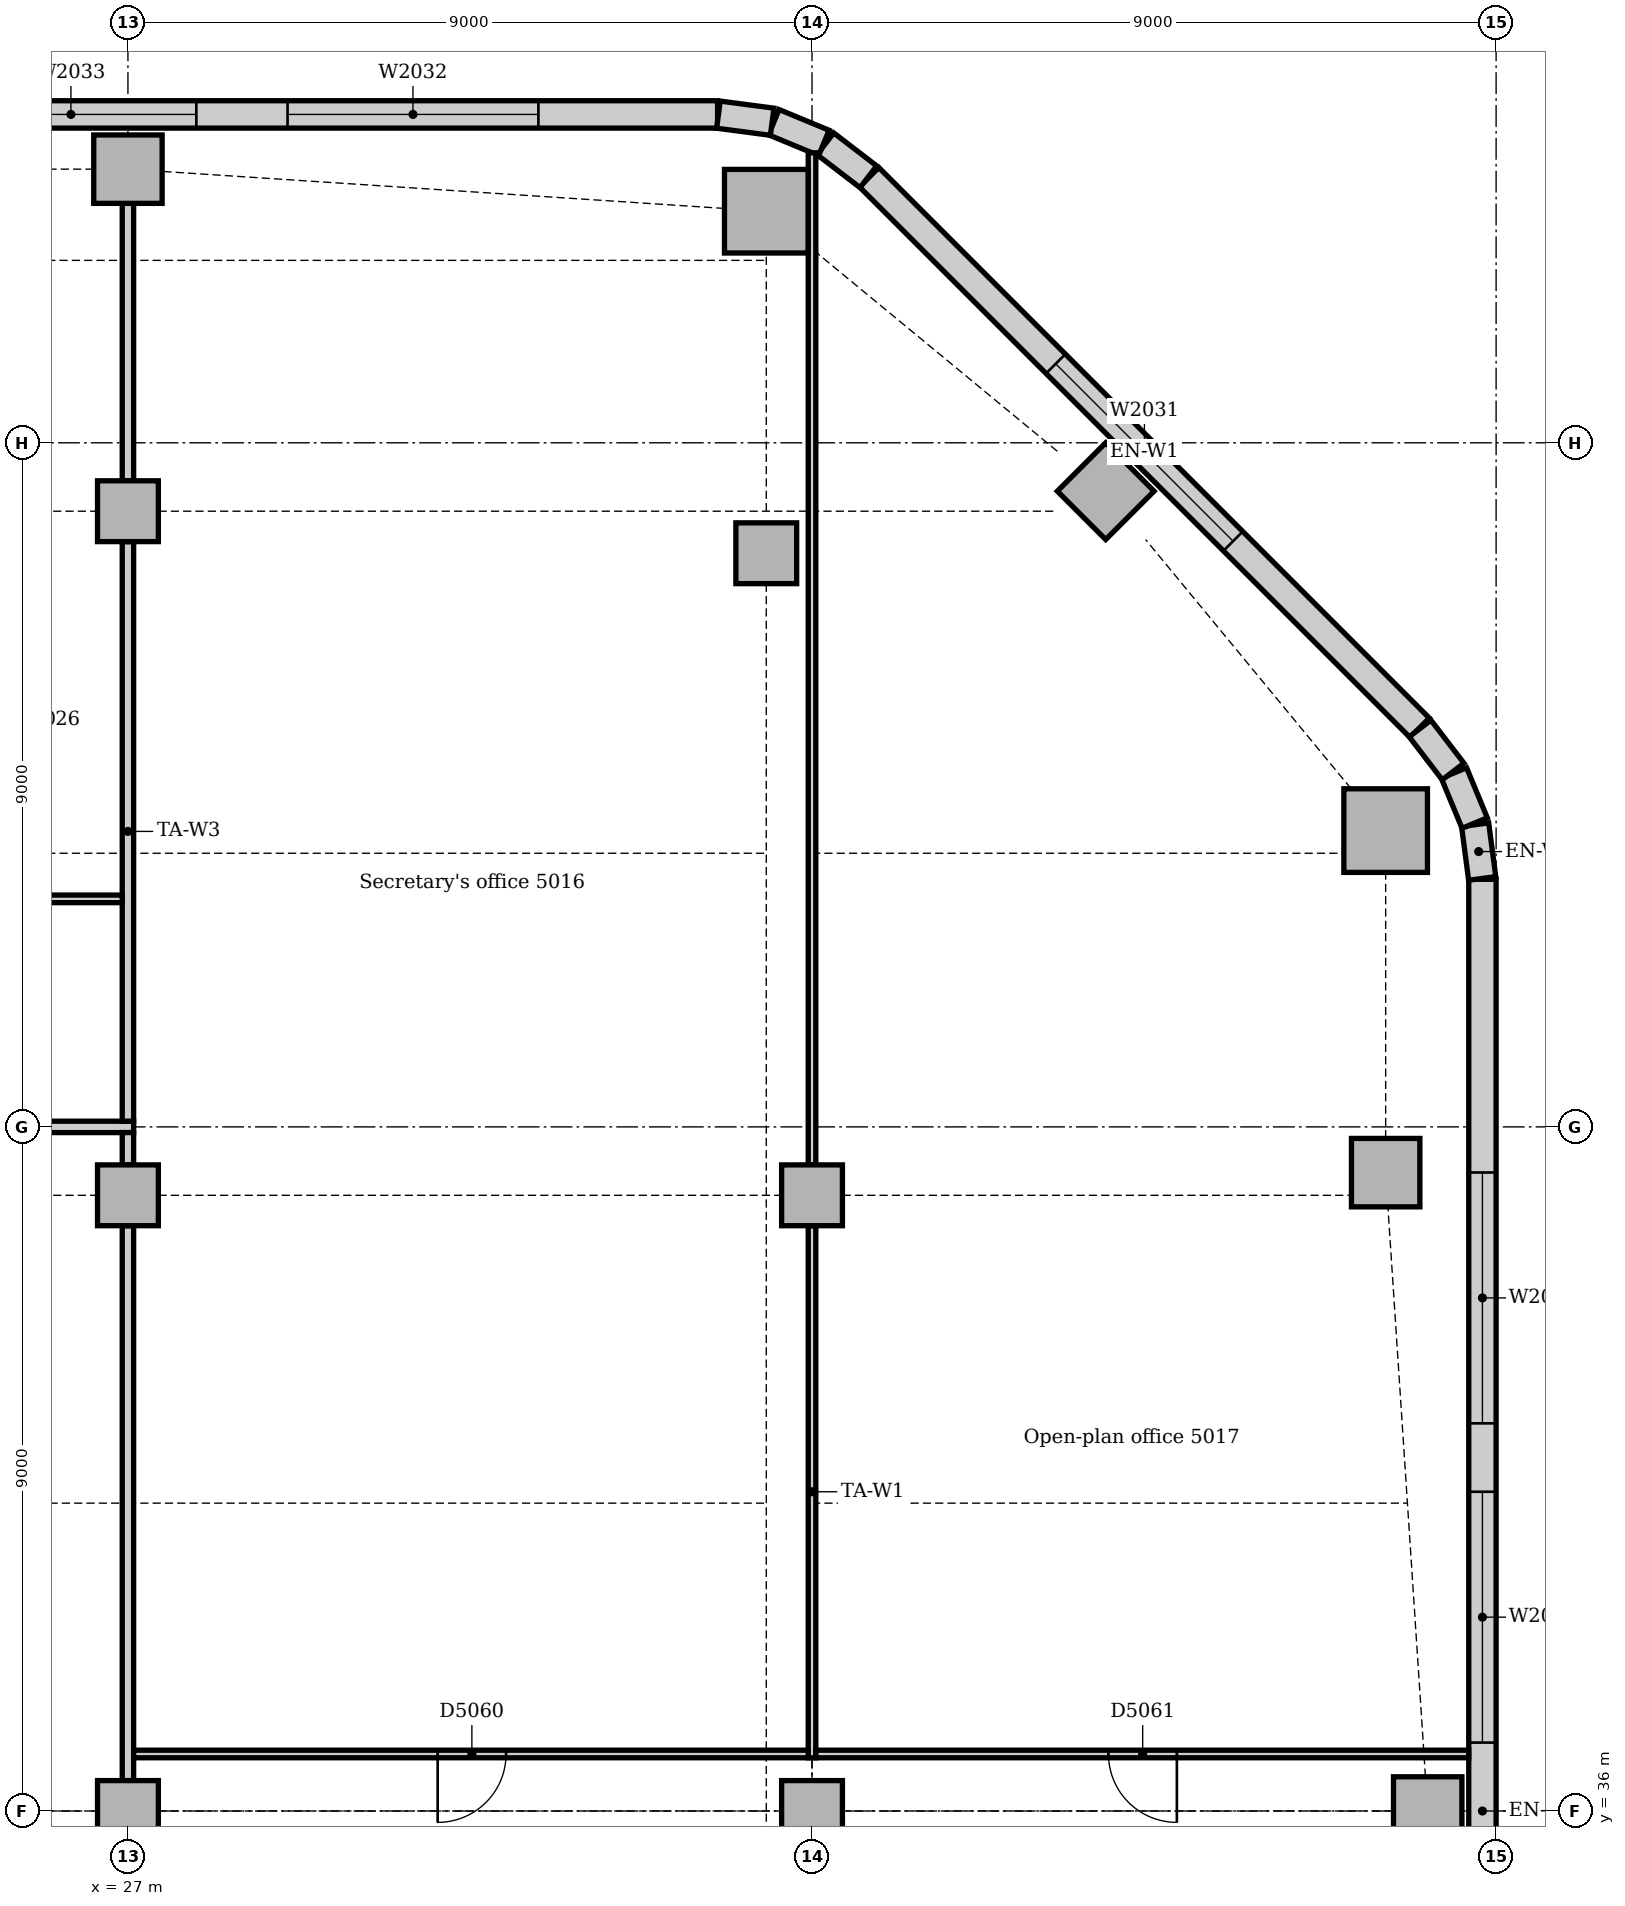
"""IFC4 building model, lengths in metres.
Left out: names, types, materials, properties, quantities, classifications, styles, units other than length and angle.
Written with IfcOpenShell. Run it as: python <this file> out.ifc"""

import sys

from ifc_helpers import new_model, si_unit, direction, frame, frame_2d, origin, origin_2d, place, context, subcontext, project, spatial, rectangle, extrude, element, fill, save


model = new_model("IFC4")
c1 = context("Model", 3, precision=1e-05, world=origin(), true_north=direction((0.0, 1.0)))
c2 = subcontext(c1, "Body", "Model", "MODEL_VIEW")
j1 = project(units=[si_unit("LENGTHUNIT", "METRE"), si_unit("PLANEANGLEUNIT", "RADIAN")], contexts=[c1])
p1 = place(None, origin())
s1 = spatial("IfcSite", under=j1, at=p1, CompositionType="ELEMENT")
p2 = place(p1, origin())
s2 = spatial("IfcBuilding", under=s1, at=p2, CompositionType="ELEMENT")
p3 = place(p2, frame((0.0, 0.0, 210.0)))
s3 = spatial("IfcBuildingStorey", under=s2, at=p3, CompositionType="ELEMENT", Elevation=210.0)
for number, where, z_axis, x_axis in (
    (1, (43.547, 48.898, 0.0), (0.0, 0.0, 1.0), (1.0, 0.0, 0.0)),
    (2, (35.398, 57.047, 0.0), (0.0, 0.0, 1.0), (1.0, 0.0, 0.0)),
):
    element("IfcColumn", number, at=place(p3, frame(where, z_axis=z_axis, x_axis=x_axis)), inside=s3, PredefinedType="COLUMN", context=c2, shape_type="SweptSolid", body=[
        extrude(rectangle(XDim=1.1, YDim=1.1, at=origin_2d()), origin(), (0.0, 0.0, 1.0), 3.85),
    ])
for number, where, z_axis, x_axis in (
    (3, (44.1, 36.0, 0.0), (0.0, 0.0, 1.0), (1.0, 0.0, 0.0)),
    (4, (43.547, 44.398, 0.0), (0.0, 0.0, 1.0), (1.0, 0.0, 0.0)),
    (5, (39.864, 53.364, 0.0), (0.0, 0.0, 1.0), (0.707, 0.707, 0.0)),
    (6, (27.0, 57.6, 0.0), (0.0, 0.0, 1.0), (1.0, 0.0, 0.0)),
):
    element("IfcColumn", number, at=place(p3, frame(where, z_axis=z_axis, x_axis=x_axis)), inside=s3, PredefinedType="COLUMN", context=c2, shape_type="SweptSolid", body=[
        extrude(rectangle(XDim=0.9, YDim=0.9, at=origin_2d()), origin(), (0.0, 0.0, 1.0), 3.85),
    ])
for number, where, z_axis, x_axis in (
    (7, (27.0, 36.0, 0.0), (0.0, 0.0, 1.0), (1.0, 0.0, 0.0)),
    (8, (27.0, 44.1, 0.0), (0.0, 0.0, 1.0), (1.0, 0.0, 0.0)),
    (9, (27.0, 53.1, 0.0), (0.0, 0.0, 1.0), (1.0, 0.0, 0.0)),
    (10, (36.0, 36.0, 0.0), (0.0, 0.0, 1.0), (1.0, 0.0, 0.0)),
    (11, (36.0, 44.1, 0.0), (0.0, 0.0, 1.0), (1.0, 0.0, 0.0)),
    (12, (35.398, 52.547, 0.0), (0.0, 0.0, 1.0), (1.0, 0.0, 0.0)),
):
    element("IfcColumn", number, at=place(p3, frame(where, z_axis=z_axis, x_axis=x_axis)), inside=s3, PredefinedType="COLUMN", context=c2, shape_type="SweptSolid", body=[
        extrude(rectangle(XDim=0.8, YDim=0.8, at=origin_2d()), origin(), (0.0, 0.0, 1.0), 3.85),
    ])
p4 = place(p3, frame((44.82, 23.743, 0.0), z_axis=(0.0, 0.0, 1.0), x_axis=(0.0, 1.0, 0.0)))
e13 = element("IfcWall", 13, at=p4, inside=s3, PredefinedType="STANDARD", context=c2, shape_type="SweptSolid", body=[
    extrude(rectangle(XDim=24.515, YDim=0.36, at=frame_2d((12.257, 0.0))), origin(), (0.0, 0.0, 1.0), 3.85),
])
p5 = place(p4, frame((3.857, 0.0, 0.9)))
e14 = element("IfcOpeningElement", 14, at=p5, cuts=e13, PredefinedType="OPENING", context=c2, shape_type="SweptSolid", body=[
    extrude(rectangle(XDim=3.3, YDim=1.6, at=frame_2d((1.65, 0.8))), frame((0.0, 0.19, 0.0), z_axis=(0.0, -1.0, 0.0), x_axis=(1.0, 0.0, 0.0)), (0.0, 0.0, 1.0), 0.38),
])
p6 = place(p4, frame((8.357, 0.0, 0.9)))
e15 = element("IfcOpeningElement", 15, at=p6, cuts=e13, PredefinedType="OPENING", context=c2, shape_type="SweptSolid", body=[
    extrude(rectangle(XDim=3.3, YDim=1.6, at=frame_2d((1.65, 0.8))), frame((0.0, 0.19, 0.0), z_axis=(0.0, -1.0, 0.0), x_axis=(1.0, 0.0, 0.0)), (0.0, 0.0, 1.0), 0.38),
])
p7 = place(p4, frame((13.157, 0.0, 0.9)))
e16 = element("IfcOpeningElement", 16, at=p7, cuts=e13, PredefinedType="OPENING", context=c2, shape_type="SweptSolid", body=[
    extrude(rectangle(XDim=3.3, YDim=1.6, at=frame_2d((1.65, 0.8))), frame((0.0, 0.19, 0.0), z_axis=(0.0, -1.0, 0.0), x_axis=(1.0, 0.0, 0.0)), (0.0, 0.0, 1.0), 0.38),
])
p8 = place(p4, frame((17.357, 0.0, 0.9)))
e17 = element("IfcOpeningElement", 17, at=p8, cuts=e13, PredefinedType="OPENING", context=c2, shape_type="SweptSolid", body=[
    extrude(rectangle(XDim=3.3, YDim=1.6, at=frame_2d((1.65, 0.8))), frame((0.0, 0.19, 0.0), z_axis=(0.0, -1.0, 0.0), x_axis=(1.0, 0.0, 0.0)), (0.0, 0.0, 1.0), 0.38),
])
p9 = place(p3, frame((43.994, 50.251, 0.0), z_axis=(0.0, 0.0, 1.0), x_axis=(-0.707106781187, 0.707106781187, 0.0)))
e18 = element("IfcWall", 18, at=p9, inside=s3, PredefinedType="STANDARD", context=c2, shape_type="SweptSolid", body=[
    extrude(rectangle(XDim=10.243, YDim=0.36, at=frame_2d((5.121, 0.0))), origin(), (0.0, 0.0, 1.0), 3.85),
])
p10 = place(p9, frame((3.471, 0.0, 0.9)))
e19 = element("IfcOpeningElement", 19, at=p10, cuts=e18, PredefinedType="OPENING", context=c2, shape_type="SweptSolid", body=[
    extrude(rectangle(XDim=3.3, YDim=1.6, at=frame_2d((1.65, 0.8))), frame((0.0, 0.19, 0.0), z_axis=(0.0, -1.0, 0.0), x_axis=(1.0, 0.0, 0.0)), (0.0, 0.0, 1.0), 0.38),
])
p11 = place(p3, frame((34.757, 58.32, 0.0), z_axis=(0.0, 0.0, 1.0), x_axis=(-1.0, 0.0, 0.0)))
e20 = element("IfcWall", 20, at=p11, inside=s3, PredefinedType="STANDARD", context=c2, shape_type="SweptSolid", body=[
    extrude(rectangle(XDim=30.515, YDim=0.36, at=frame_2d((15.257, 0.0))), origin(), (0.0, 0.0, 1.0), 3.85),
])
p12 = place(p11, frame((2.357, 0.0, 0.9)))
e21 = element("IfcOpeningElement", 21, at=p12, cuts=e20, PredefinedType="OPENING", context=c2, shape_type="SweptSolid", body=[
    extrude(rectangle(XDim=3.3, YDim=1.6, at=frame_2d((1.65, 0.8))), frame((0.0, 0.19, 0.0), z_axis=(0.0, -1.0, 0.0), x_axis=(1.0, 0.0, 0.0)), (0.0, 0.0, 1.0), 0.38),
])
p13 = place(p11, frame((6.857, 0.0, 0.9)))
e22 = element("IfcOpeningElement", 22, at=p13, cuts=e20, PredefinedType="OPENING", context=c2, shape_type="SweptSolid", body=[
    extrude(rectangle(XDim=3.3, YDim=1.6, at=frame_2d((1.65, 0.8))), frame((0.0, 0.19, 0.0), z_axis=(0.0, -1.0, 0.0), x_axis=(1.0, 0.0, 0.0)), (0.0, 0.0, 1.0), 0.38),
])
p14 = place(p11, frame((12.457, 0.0, 0.9)))
e23 = element("IfcOpeningElement", 23, at=p14, cuts=e20, PredefinedType="OPENING", context=c2, shape_type="SweptSolid", body=[
    extrude(rectangle(XDim=1.8, YDim=1.6, at=frame_2d((0.9, 0.8))), frame((0.0, 0.19, 0.0), z_axis=(0.0, -1.0, 0.0), x_axis=(1.0, 0.0, 0.0)), (0.0, 0.0, 1.0), 0.38),
])
p15 = place(p11, frame((15.857, 0.0, 0.9)))
e24 = element("IfcOpeningElement", 24, at=p15, cuts=e20, PredefinedType="OPENING", context=c2, shape_type="SweptSolid", body=[
    extrude(rectangle(XDim=3.3, YDim=1.6, at=frame_2d((1.65, 0.8))), frame((0.0, 0.19, 0.0), z_axis=(0.0, -1.0, 0.0), x_axis=(1.0, 0.0, 0.0)), (0.0, 0.0, 1.0), 0.38),
])
p16 = place(p11, frame((20.357, 0.0, 0.9)))
e25 = element("IfcOpeningElement", 25, at=p16, cuts=e20, PredefinedType="OPENING", context=c2, shape_type="SweptSolid", body=[
    extrude(rectangle(XDim=3.3, YDim=1.6, at=frame_2d((1.65, 0.8))), frame((0.0, 0.19, 0.0), z_axis=(0.0, -1.0, 0.0), x_axis=(1.0, 0.0, 0.0)), (0.0, 0.0, 1.0), 0.38),
])
p17 = place(p11, frame((24.857, 0.0, 0.9)))
e26 = element("IfcOpeningElement", 26, at=p17, cuts=e20, PredefinedType="OPENING", context=c2, shape_type="SweptSolid", body=[
    extrude(rectangle(XDim=3.3, YDim=1.6, at=frame_2d((1.65, 0.8))), frame((0.0, 0.19, 0.0), z_axis=(0.0, -1.0, 0.0), x_axis=(1.0, 0.0, 0.0)), (0.0, 0.0, 1.0), 0.38),
])
for number, where, z_axis, x_axis in (
    (27, (44.817, 48.269, 0.0), (0.0, 0.0, 1.0), (-0.131, 0.991, 0.0)),
    (28, (44.718, 48.997, 0.0), (0.0, 0.0, 1.0), (-0.383, 0.924, 0.0)),
):
    element("IfcWall", number, at=place(p3, frame(where, z_axis=z_axis, x_axis=x_axis)), inside=s3, PredefinedType="STANDARD", context=c2, shape_type="SweptSolid", body=[
        extrude(rectangle(XDim=0.713, YDim=0.36, at=frame_2d((0.356, 0.0))), origin(), (0.0, 0.0, 1.0), 3.85),
    ])
for number, where, z_axis, x_axis in (
    (29, (44.434, 49.675, 0.0), (0.0, 0.0, 1.0), (-0.609, 0.793, 0.0)),
    (30, (36.741, 57.5, 0.0), (0.0, 0.0, 1.0), (-0.793, 0.609, 0.0)),
):
    element("IfcWall", number, at=place(p3, frame(where, z_axis=z_axis, x_axis=x_axis)), inside=s3, PredefinedType="STANDARD", context=c2, shape_type="SweptSolid", body=[
        extrude(rectangle(XDim=0.713, YDim=0.36, at=frame_2d((0.357, 0.0))), origin(), (0.0, 0.0, 1.0), 3.85),
    ])
for number, where, z_axis, x_axis in (
    (31, (36.156, 57.945, 0.0), (0.0, 0.0, 1.0), (-0.924, 0.383, 0.0)),
    (32, (35.476, 58.224, 0.0), (0.0, 0.0, 1.0), (-0.991, 0.131, 0.0)),
):
    element("IfcWall", number, at=place(p3, frame(where, z_axis=z_axis, x_axis=x_axis)), inside=s3, PredefinedType="STANDARD", context=c2, shape_type="SweptSolid", body=[
        extrude(rectangle(XDim=0.713, YDim=0.36, at=frame_2d((0.356, 0.0))), origin(), (0.0, 0.0, 1.0), 3.85),
    ])
p18 = place(p3, frame((0.36, 45.0, 0.0), z_axis=(0.0, 0.0, 1.0), x_axis=(1.0, 0.0, 0.0)))
e33 = element("IfcWall", 33, at=p18, inside=s3, PredefinedType="PARTITIONING", context=c2, shape_type="SweptSolid", body=[
    extrude(rectangle(XDim=26.715, YDim=0.15, at=frame_2d((13.357, 0.0))), origin(), (0.0, 0.0, 1.0), 3.85),
])
p19 = place(p18, frame((9.05, 0.0, 0.0)))
e34 = element("IfcOpeningElement", 34, at=p19, cuts=e33, PredefinedType="OPENING", context=c2, shape_type="SweptSolid", body=[
    extrude(rectangle(XDim=0.9, YDim=2.1, at=frame_2d((0.45, 1.05))), frame((0.0, 0.085, 0.0), z_axis=(0.0, -1.0, 0.0), x_axis=(1.0, 0.0, 0.0)), (0.0, 0.0, 1.0), 0.17),
])
p20 = place(p18, frame((21.59, 0.0, 0.0)))
e35 = element("IfcOpeningElement", 35, at=p20, cuts=e33, PredefinedType="OPENING", context=c2, shape_type="SweptSolid", body=[
    extrude(rectangle(XDim=1.0, YDim=2.1, at=frame_2d((0.5, 1.05))), frame((0.0, 0.085, 0.0), z_axis=(0.0, -1.0, 0.0), x_axis=(1.0, 0.0, 0.0)), (0.0, 0.0, 1.0), 0.17),
])
p21 = place(p3, frame((27.0, 36.4, 0.0), z_axis=(0.0, 0.0, 1.0), x_axis=(0.0, 1.0, 0.0)))
e36 = element("IfcWall", 36, at=p21, inside=s3, PredefinedType="PARTITIONING", context=c2, shape_type="SweptSolid", body=[
    extrude(rectangle(XDim=7.3, YDim=0.15, at=frame_2d((3.65, 0.0))), origin(), (0.0, 0.0, 1.0), 3.35),
])
p22 = place(p3, frame((27.0, 44.5, 0.0), z_axis=(0.0, 0.0, 1.0), x_axis=(0.0, 1.0, 0.0)))
e37 = element("IfcWall", 37, at=p22, inside=s3, PredefinedType="PARTITIONING", context=c2, shape_type="SweptSolid", body=[
    extrude(rectangle(XDim=0.425, YDim=0.15, at=frame_2d((0.212, 0.0))), origin(), (0.0, 0.0, 1.0), 3.85),
])
p23 = place(p3, frame((27.0, 45.075, 0.0), z_axis=(0.0, 0.0, 1.0), x_axis=(0.0, 1.0, 0.0)))
e38 = element("IfcWall", 38, at=p23, inside=s3, PredefinedType="PARTITIONING", context=c2, shape_type="SweptSolid", body=[
    extrude(rectangle(XDim=7.625, YDim=0.15, at=frame_2d((3.812, 0.0))), origin(), (0.0, 0.0, 1.0), 3.35),
])
p24 = place(p3, frame((27.0, 53.5, 0.0), z_axis=(0.0, 0.0, 1.0), x_axis=(0.0, 1.0, 0.0)))
e39 = element("IfcWall", 39, at=p24, inside=s3, PredefinedType="PARTITIONING", context=c2, shape_type="SweptSolid", body=[
    extrude(rectangle(XDim=3.65, YDim=0.15, at=frame_2d((1.825, 0.0))), origin(), (0.0, 0.0, 1.0), 3.41),
])
p25 = place(p3, frame((36.0, 36.7, 0.0), z_axis=(0.0, 0.0, 1.0), x_axis=(0.0, 1.0, 0.0)))
e40 = element("IfcWall", 40, at=p25, inside=s3, PredefinedType="PARTITIONING", context=c2, shape_type="SweptSolid", body=[
    extrude(rectangle(XDim=7.0, YDim=0.1, at=frame_2d((3.5, 0.0))), origin(), (0.0, 0.0, 1.0), 3.35),
])
p26 = place(p3, frame((36.0, 44.5, 0.0), z_axis=(0.0, 0.0, 1.0), x_axis=(0.0, 1.0, 0.0)))
e41 = element("IfcWall", 41, at=p26, inside=s3, PredefinedType="PARTITIONING", context=c2, shape_type="SweptSolid", body=[
    extrude(rectangle(XDim=13.315, YDim=0.1, at=frame_2d((6.657, 0.0))), origin(), (0.0, 0.0, 1.0), 3.35),
])
p27 = place(p3, frame((27.075, 36.75, 0.0), z_axis=(0.0, 0.0, 1.0), x_axis=(1.0, 0.0, 0.0)))
e42 = element("IfcWall", 42, at=p27, inside=s3, PredefinedType="PARTITIONING", context=c2, shape_type="SweptSolid", body=[
    extrude(rectangle(XDim=8.875, YDim=0.1, at=frame_2d((4.438, 0.0))), origin(), (0.0, 0.0, 1.0), 3.85),
])
p28 = place(p27, frame((4.0, 0.0, 0.0)))
e43 = element("IfcOpeningElement", 43, at=p28, cuts=e42, PredefinedType="OPENING", context=c2, shape_type="SweptSolid", body=[
    extrude(rectangle(XDim=0.9, YDim=2.1, at=frame_2d((0.45, 1.05))), frame((0.0, 0.06, 0.0), z_axis=(0.0, -1.0, 0.0), x_axis=(1.0, 0.0, 0.0)), (0.0, 0.0, 1.0), 0.12),
])
p29 = place(p3, frame((36.05, 36.75, 0.0), z_axis=(0.0, 0.0, 1.0), x_axis=(1.0, 0.0, 0.0)))
e44 = element("IfcWall", 44, at=p29, inside=s3, PredefinedType="PARTITIONING", context=c2, shape_type="SweptSolid", body=[
    extrude(rectangle(XDim=8.59, YDim=0.1, at=frame_2d((4.295, 0.0))), origin(), (0.0, 0.0, 1.0), 3.85),
])
p30 = place(p29, frame((3.85, 0.0, 0.0)))
e45 = element("IfcOpeningElement", 45, at=p30, cuts=e44, PredefinedType="OPENING", context=c2, shape_type="SweptSolid", body=[
    extrude(rectangle(XDim=0.9, YDim=2.1, at=frame_2d((0.45, 1.05))), frame((0.0, 0.06, 0.0), z_axis=(0.0, -1.0, 0.0), x_axis=(1.0, 0.0, 0.0)), (0.0, 0.0, 1.0), 0.12),
])
p31 = place(p3, frame((22.55, 48.0, 0.0), z_axis=(0.0, 0.0, 1.0), x_axis=(1.0, 0.0, 0.0)))
e46 = element("IfcWall", 46, at=p31, inside=s3, PredefinedType="PARTITIONING", context=c2, shape_type="SweptSolid", body=[
    extrude(rectangle(XDim=4.375, YDim=0.1, at=frame_2d((2.188, 0.0))), origin(), (0.0, 0.0, 1.0), 3.85),
])
p32 = place(p31, frame((1.75, 0.0, 0.0)))
e47 = element("IfcOpeningElement", 47, at=p32, cuts=e46, PredefinedType="OPENING", context=c2, shape_type="SweptSolid", body=[
    extrude(rectangle(XDim=0.9, YDim=2.1, at=frame_2d((0.45, 1.05))), frame((0.0, 0.06, 0.0), z_axis=(0.0, -1.0, 0.0), x_axis=(1.0, 0.0, 0.0)), (0.0, 0.0, 1.0), 0.12),
])
p33 = place(p7, origin())
e48 = element("IfcWindow", 48, at=p33, inside=s3, PartitioningType="SINGLE_PANEL", PredefinedType="WINDOW", context=c2, shape_type="SweptSolid", body=[
    extrude(rectangle(XDim=3.3, YDim=1.6, at=frame_2d((1.65, 0.8))), frame((0.0, 0.13, 0.0), z_axis=(0.0, -1.0, 0.0), x_axis=(1.0, 0.0, 0.0)), (0.0, 0.0, 1.0), 0.06),
])
fill(e16, e48)
p34 = place(p8, origin())
e49 = element("IfcWindow", 49, at=p34, inside=s3, PartitioningType="SINGLE_PANEL", PredefinedType="WINDOW", context=c2, shape_type="SweptSolid", body=[
    extrude(rectangle(XDim=3.3, YDim=1.6, at=frame_2d((1.65, 0.8))), frame((0.0, 0.13, 0.0), z_axis=(0.0, -1.0, 0.0), x_axis=(1.0, 0.0, 0.0)), (0.0, 0.0, 1.0), 0.06),
])
fill(e17, e49)
p35 = place(p10, origin())
e50 = element("IfcWindow", 50, at=p35, inside=s3, PartitioningType="SINGLE_PANEL", PredefinedType="WINDOW", context=c2, shape_type="SweptSolid", body=[
    extrude(rectangle(XDim=3.3, YDim=1.6, at=frame_2d((1.65, 0.8))), frame((0.0, 0.13, 0.0), z_axis=(0.0, -1.0, 0.0), x_axis=(1.0, 0.0, 0.0)), (0.0, 0.0, 1.0), 0.06),
])
fill(e19, e50)
p36 = place(p12, origin())
e51 = element("IfcWindow", 51, at=p36, inside=s3, PartitioningType="SINGLE_PANEL", PredefinedType="WINDOW", context=c2, shape_type="SweptSolid", body=[
    extrude(rectangle(XDim=3.3, YDim=1.6, at=frame_2d((1.65, 0.8))), frame((0.0, 0.13, 0.0), z_axis=(0.0, -1.0, 0.0), x_axis=(1.0, 0.0, 0.0)), (0.0, 0.0, 1.0), 0.06),
])
fill(e21, e51)
p37 = place(p13, origin())
e52 = element("IfcWindow", 52, at=p37, inside=s3, PartitioningType="SINGLE_PANEL", PredefinedType="WINDOW", context=c2, shape_type="SweptSolid", body=[
    extrude(rectangle(XDim=3.3, YDim=1.6, at=frame_2d((1.65, 0.8))), frame((0.0, 0.13, 0.0), z_axis=(0.0, -1.0, 0.0), x_axis=(1.0, 0.0, 0.0)), (0.0, 0.0, 1.0), 0.06),
])
fill(e22, e52)
p38 = place(p28, frame((0.9, 0.0, 0.0), z_axis=(0.0, 0.0, 1.0), x_axis=(-1.0, 0.0, 0.0)))
e53 = element("IfcDoor", 53, at=p38, inside=s3, OperationType="SINGLE_SWING_RIGHT", PredefinedType="DOOR", context=c2, shape_type="SweptSolid", body=[
    extrude(rectangle(XDim=0.9, YDim=2.1, at=frame_2d((0.45, 1.05))), frame((0.0, 0.025, 0.0), z_axis=(0.0, -1.0, 0.0), x_axis=(1.0, 0.0, 0.0)), (0.0, 0.0, 1.0), 0.05),
])
fill(e43, e53)
p39 = place(p30, frame((0.9, 0.0, 0.0), z_axis=(0.0, 0.0, 1.0), x_axis=(-1.0, 0.0, 0.0)))
e54 = element("IfcDoor", 54, at=p39, inside=s3, OperationType="SINGLE_SWING_LEFT", PredefinedType="DOOR", context=c2, shape_type="SweptSolid", body=[
    extrude(rectangle(XDim=0.9, YDim=2.1, at=frame_2d((0.45, 1.05))), frame((0.0, 0.025, 0.0), z_axis=(0.0, -1.0, 0.0), x_axis=(1.0, 0.0, 0.0)), (0.0, 0.0, 1.0), 0.05),
])
fill(e45, e54)
save(model, sys.argv[1])
